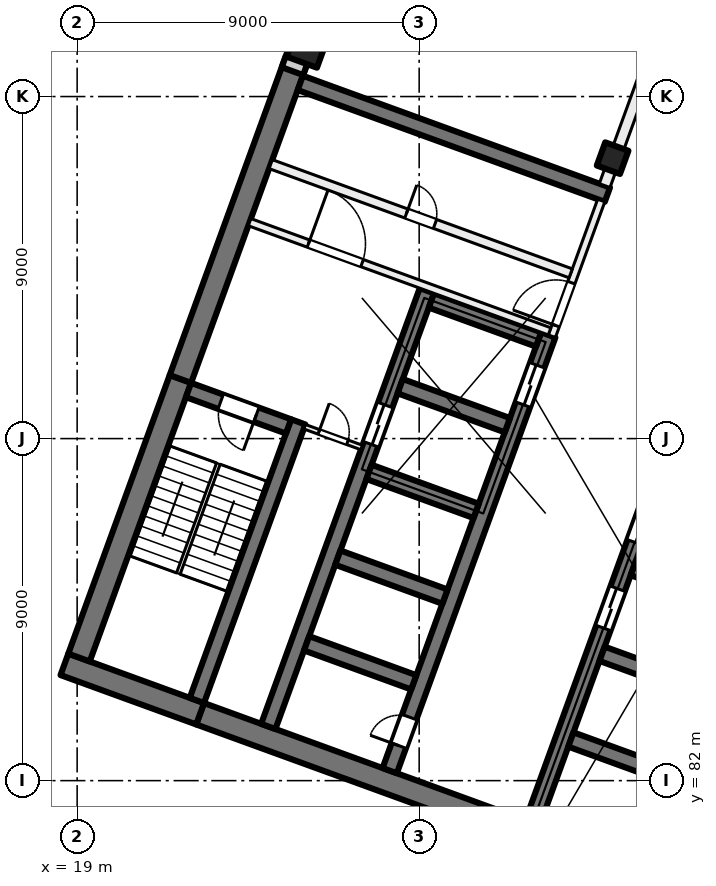
"""IFC4 building model, lengths in metres.
Left out: names, types, materials, properties, quantities, classifications, styles, units other than length and angle.
Written with IfcOpenShell. Run it as: python <this file> out.ifc"""

import sys

from ifc_helpers import new_model, si_unit, direction, frame, frame_2d, origin, origin_2d, place, context, subcontext, project, spatial, rectangle, extrude, element, fill, save


model = new_model("IFC4")
c1 = context("Model", 3, precision=1e-05, world=origin(), true_north=direction((0.0, 1.0)))
c2 = subcontext(c1, "Body", "Model", "MODEL_VIEW")
j1 = project(units=[si_unit("LENGTHUNIT", "METRE"), si_unit("PLANEANGLEUNIT", "RADIAN")], contexts=[c1])
p1 = place(None, origin())
s1 = spatial("IfcSite", under=j1, at=p1, CompositionType="ELEMENT")
p2 = place(p1, origin())
s2 = spatial("IfcBuilding", under=s1, at=p2, CompositionType="ELEMENT")
p3 = place(p2, frame((0.0, 0.0, 93.0)))
s3 = spatial("IfcBuildingStorey", under=s2, at=p3, CompositionType="ELEMENT", Elevation=93.0)
p4 = place(p3, frame((33.091, 98.379, 0.0), z_axis=(0.0, 0.0, 1.0), x_axis=(-0.342020143326, -0.939692620786, 0.0)))
e1 = element("IfcColumn", 1, at=p4, inside=s3, PredefinedType="COLUMN", context=c2, shape_type="SweptSolid", body=[
    extrude(rectangle(XDim=0.65, YDim=0.65, at=origin_2d()), origin(), (0.0, 0.0, 1.0), 4.0),
])
p5 = place(p3, frame((25.056, 101.303, 0.0), z_axis=(0.0, 0.0, 1.0), x_axis=(-0.342020143326, -0.939692620786, 0.0)))
e2 = element("IfcColumn", 2, at=p5, inside=s3, PredefinedType="COLUMN", context=c2, shape_type="SweptSolid", body=[
    extrude(rectangle(XDim=0.85, YDim=0.85, at=origin_2d()), origin(), (0.0, 0.0, 1.0), 4.0),
])
p6 = place(p3, frame((35.767, 78.835, 0.0), z_axis=(0.0, 0.0, 1.0), x_axis=(-0.939692894512, 0.342019391267, 0.0)))
e3 = element("IfcWall", 3, at=p6, inside=s3, PredefinedType="SHEAR", context=c2, shape_type="SweptSolid", body=[
    extrude(rectangle(XDim=14.4, YDim=0.6, at=frame_2d((7.2, 0.0))), origin(), (0.0, 0.0, 1.0), 4.0),
])
p7 = place(p3, frame((22.236, 83.76, 0.0), z_axis=(0.0, 0.0, 1.0), x_axis=(-0.939680822529, 0.342052557032, 0.0)))
e4 = element("IfcWall", 4, at=p7, inside=s3, PredefinedType="SHEAR", context=c2, shape_type="SweptSolid", body=[
    extrude(rectangle(XDim=3.8, YDim=0.6, at=frame_2d((1.9, 0.0))), origin(), (0.0, 0.0, 1.0), 4.0),
])
p8 = place(p3, frame((19.05, 85.239, 0.0), z_axis=(0.0, 0.0, 1.0), x_axis=(0.342016982193, 0.939693771338, 0.0)))
e5 = element("IfcWall", 5, at=p8, inside=s3, PredefinedType="SHEAR", context=c2, shape_type="SweptSolid", body=[
    extrude(rectangle(XDim=7.8, YDim=0.6, at=frame_2d((3.9, 0.0))), origin(), (0.0, 0.0, 1.0), 4.0),
])
p9 = place(p3, frame((21.717, 92.568, 0.0), z_axis=(0.0, 0.0, 1.0), x_axis=(0.342017595281, 0.939693548195, 0.0)))
e6 = element("IfcWall", 6, at=p9, inside=s3, PredefinedType="SHEAR", context=c2, shape_type="SweptSolid", body=[
    extrude(rectangle(XDim=8.925, YDim=0.6, at=frame_2d((4.462, 0.0))), origin(), (0.0, 0.0, 1.0), 4.0),
])
p10 = place(p3, frame((22.15, 84.11, 0.0), z_axis=(0.0, 0.0, 1.0), x_axis=(0.342016982193, 0.939693771338, 0.0)))
e7 = element("IfcWall", 7, at=p10, inside=s3, PredefinedType="SHEAR", context=c2, shape_type="SweptSolid", body=[
    extrude(rectangle(XDim=7.8, YDim=0.4, at=frame_2d((3.9, 0.0))), origin(), (0.0, 0.0, 1.0), 4.0),
])
p11 = place(p3, frame((24.562, 91.32, 0.0), z_axis=(0.0, 0.0, 1.0), x_axis=(-0.939717030584, 0.341953070509, 0.0)))
e8 = element("IfcWall", 8, at=p11, inside=s3, PredefinedType="SHEAR", context=c2, shape_type="SweptSolid", body=[
    extrude(rectangle(XDim=2.8, YDim=0.4, at=frame_2d((1.4, 0.0))), origin(), (0.0, 0.0, 1.0), 4.0),
])
p12 = place(p11, frame((0.9, 0.0, 0.0)))
e9 = element("IfcOpeningElement", 9, at=p12, cuts=e8, PredefinedType="OPENING", context=c2, shape_type="SweptSolid", body=[
    extrude(rectangle(XDim=1.0, YDim=2.1, at=frame_2d((0.5, 1.05))), frame((0.0, 0.21, 0.0), z_axis=(0.0, -1.0, 0.0), x_axis=(1.0, 0.0, 0.0)), (0.0, 0.0, 1.0), 0.42),
])
p13 = place(p3, frame((30.984, 80.895, 0.0), z_axis=(0.0, 0.0, 1.0), x_axis=(0.342021021735, 0.939692301071, 0.0)))
e10 = element("IfcWall", 10, at=p13, inside=s3, PredefinedType="SHEAR", context=c2, shape_type="SweptSolid", body=[
    extrude(rectangle(XDim=12.2, YDim=0.4, at=frame_2d((6.1, 0.0))), origin(), (0.0, 0.0, 1.0), 4.0),
])
p14 = place(p13, frame((5.45, 0.0, 0.0)))
e11 = element("IfcOpeningElement", 11, at=p14, cuts=e10, PredefinedType="OPENING", context=c2, shape_type="SweptSolid", body=[
    extrude(rectangle(XDim=1.1, YDim=2.1, at=frame_2d((0.55, 1.05))), frame((0.0, 0.21, 0.0), z_axis=(0.0, -1.0, 0.0), x_axis=(1.0, 0.0, 0.0)), (0.0, 0.0, 1.0), 0.42),
])
p15 = place(p13, frame((7.85, 0.0, 0.0)))
e12 = element("IfcOpeningElement", 12, at=p15, cuts=e10, PredefinedType="OPENING", context=c2, shape_type="SweptSolid", body=[
    extrude(rectangle(XDim=1.1, YDim=2.1, at=frame_2d((0.55, 1.05))), frame((0.0, 0.21, 0.0), z_axis=(0.0, -1.0, 0.0), x_axis=(1.0, 0.0, 0.0)), (0.0, 0.0, 1.0), 0.42),
])
p16 = place(p13, frame((10.25, 0.0, 0.0)))
e13 = element("IfcOpeningElement", 13, at=p16, cuts=e10, PredefinedType="OPENING", context=c2, shape_type="SweptSolid", body=[
    extrude(rectangle(XDim=1.1, YDim=2.1, at=frame_2d((0.55, 1.05))), frame((0.0, 0.21, 0.0), z_axis=(0.0, -1.0, 0.0), x_axis=(1.0, 0.0, 0.0)), (0.0, 0.0, 1.0), 0.42),
])
for number, where, z_axis, x_axis in (
    (14, (34.812, 82.056, 0.0), (0.0, 0.0, 1.0), (-0.94, 0.342, 0.0)),
    (15, (35.632, 84.311, 0.0), (0.0, 0.0, 1.0), (-0.94, 0.342, 0.0)),
    (16, (36.453, 86.566, 0.0), (0.0, 0.0, 1.0), (-0.94, 0.342, 0.0)),
):
    element("IfcWall", number, at=place(p3, frame(where, z_axis=z_axis, x_axis=x_axis)), inside=s3, PredefinedType="SHEAR", context=c2, shape_type="SweptSolid", body=[
        extrude(rectangle(XDim=3.0, YDim=0.4, at=frame_2d((1.5, 0.0))), origin(), (0.0, 0.0, 1.0), 4.0),
    ])
p17 = place(p3, frame((27.225, 82.263, 0.0), z_axis=(0.0, 0.0, 1.0), x_axis=(0.342014590177, 0.939694641948, 0.0)))
e17 = element("IfcWall", 17, at=p17, inside=s3, PredefinedType="SHEAR", context=c2, shape_type="SweptSolid", body=[
    extrude(rectangle(XDim=12.2, YDim=0.4, at=frame_2d((6.1, 0.0))), origin(), (0.0, 0.0, 1.0), 4.0),
])
p18 = place(p17, frame((10.25, 0.0, 0.0)))
e18 = element("IfcOpeningElement", 18, at=p18, cuts=e17, PredefinedType="OPENING", context=c2, shape_type="SweptSolid", body=[
    extrude(rectangle(XDim=1.1, YDim=2.1, at=frame_2d((0.55, 1.05))), frame((0.0, 0.21, 0.0), z_axis=(0.0, -1.0, 0.0), x_axis=(1.0, 0.0, 0.0)), (0.0, 0.0, 1.0), 0.42),
])
p19 = place(p17, frame((0.7, 0.0, 0.0)))
e19 = element("IfcOpeningElement", 19, at=p19, cuts=e17, PredefinedType="OPENING", context=c2, shape_type="SweptSolid", body=[
    extrude(rectangle(XDim=0.8, YDim=2.1, at=frame_2d((0.4, 1.05))), frame((0.0, 0.21, 0.0), z_axis=(0.0, -1.0, 0.0), x_axis=(1.0, 0.0, 0.0)), (0.0, 0.0, 1.0), 0.42),
])
p20 = place(p3, frame((24.03, 83.426, 0.0), z_axis=(0.0, 0.0, 1.0), x_axis=(0.342014590177, 0.939694641948, 0.0)))
e20 = element("IfcWall", 20, at=p20, inside=s3, PredefinedType="SHEAR", context=c2, shape_type="SweptSolid", body=[
    extrude(rectangle(XDim=12.2, YDim=0.4, at=frame_2d((6.1, 0.0))), origin(), (0.0, 0.0, 1.0), 4.0),
])
p21 = place(p20, frame((7.9, 0.0, 0.0)))
e21 = element("IfcOpeningElement", 21, at=p21, cuts=e20, PredefinedType="OPENING", context=c2, shape_type="SweptSolid", body=[
    extrude(rectangle(XDim=1.1, YDim=2.1, at=frame_2d((0.55, 1.05))), frame((0.0, 0.21, 0.0), z_axis=(0.0, -1.0, 0.0), x_axis=(1.0, 0.0, 0.0)), (0.0, 0.0, 1.0), 0.42),
])
p22 = place(p3, frame((27.858, 84.587, 0.0), z_axis=(0.0, 0.0, 1.0), x_axis=(-0.939686455819, 0.342037080957, 0.0)))
e22 = element("IfcWall", 22, at=p22, inside=s3, PredefinedType="SHEAR", context=c2, shape_type="SweptSolid", body=[
    extrude(rectangle(XDim=3.0, YDim=0.4, at=frame_2d((1.5, 0.0))), origin(), (0.0, 0.0, 1.0), 4.0),
])
p23 = place(p3, frame((28.678, 86.842, 0.0), z_axis=(0.0, 0.0, 1.0), x_axis=(-0.939676934218, 0.342063238742, 0.0)))
e23 = element("IfcWall", 23, at=p23, inside=s3, PredefinedType="SHEAR", context=c2, shape_type="SweptSolid", body=[
    extrude(rectangle(XDim=3.0, YDim=0.4, at=frame_2d((1.5, 0.0))), origin(), (0.0, 0.0, 1.0), 4.0),
])
for number, where, z_axis, x_axis in (
    (24, (29.5, 89.097, 0.0), (0.0, 0.0, 1.0), (-0.94, 0.342, 0.0)),
    (25, (30.32, 91.353, 0.0), (0.0, 0.0, 1.0), (-0.94, 0.342, 0.0)),
    (26, (31.141, 93.608, 0.0), (0.0, 0.0, 1.0), (-0.94, 0.342, 0.0)),
):
    element("IfcWall", number, at=place(p3, frame(where, z_axis=z_axis, x_axis=x_axis)), inside=s3, PredefinedType="SHEAR", context=c2, shape_type="SweptSolid", body=[
        extrude(rectangle(XDim=3.0, YDim=0.4, at=frame_2d((1.5, 0.0))), origin(), (0.0, 0.0, 1.0), 4.0),
    ])
p24 = place(p3, frame((32.953, 97.418, 0.0), z_axis=(0.0, 0.0, 1.0), x_axis=(-0.93969060187, 0.342025690201, 0.0)))
e27 = element("IfcWall", 27, at=p24, inside=s3, PredefinedType="SHEAR", context=c2, shape_type="SweptSolid", body=[
    extrude(rectangle(XDim=8.6, YDim=0.4, at=frame_2d((4.3, 0.0))), origin(), (0.0, 0.0, 1.0), 4.0),
])
p25 = place(p3, frame((24.666, 100.669, 0.0), z_axis=(0.0, 0.0, 1.0), x_axis=(0.34201964167, 0.939692803373, 0.0)))
e28 = element("IfcWall", 28, at=p25, inside=s3, PredefinedType="SOLIDWALL", context=c2, shape_type="SweptSolid", body=[
    extrude(rectangle(XDim=32.884, YDim=0.6, at=frame_2d((16.442, 0.0))), origin(), (0.0, 0.0, 1.0), 3.625),
])
p26 = place(p25, frame((1.48, 0.0, 0.9)))
e29 = element("IfcOpeningElement", 29, at=p26, cuts=e28, PredefinedType="OPENING", context=c2, shape_type="SweptSolid", body=[
    extrude(rectangle(XDim=3.0, YDim=2.4, at=frame_2d((1.5, 1.2))), frame((0.0, 0.31, 0.0), z_axis=(0.0, -1.0, 0.0), x_axis=(1.0, 0.0, 0.0)), (0.0, 0.0, 1.0), 0.62),
])
p27 = place(p25, frame((5.98, 0.0, 0.9)))
e30 = element("IfcOpeningElement", 30, at=p27, cuts=e28, PredefinedType="OPENING", context=c2, shape_type="SweptSolid", body=[
    extrude(rectangle(XDim=3.0, YDim=2.4, at=frame_2d((1.5, 1.2))), frame((0.0, 0.31, 0.0), z_axis=(0.0, -1.0, 0.0), x_axis=(1.0, 0.0, 0.0)), (0.0, 0.0, 1.0), 0.62),
])
p28 = place(p25, frame((10.48, 0.0, 0.9)))
e31 = element("IfcOpeningElement", 31, at=p28, cuts=e28, PredefinedType="OPENING", context=c2, shape_type="SweptSolid", body=[
    extrude(rectangle(XDim=3.0, YDim=2.4, at=frame_2d((1.5, 1.2))), frame((0.0, 0.31, 0.0), z_axis=(0.0, -1.0, 0.0), x_axis=(1.0, 0.0, 0.0)), (0.0, 0.0, 1.0), 0.62),
])
p29 = place(p25, frame((15.58, 0.0, 0.0)))
e32 = element("IfcOpeningElement", 32, at=p29, cuts=e28, PredefinedType="OPENING", context=c2, shape_type="SweptSolid", body=[
    extrude(rectangle(XDim=1.8, YDim=2.4, at=frame_2d((0.9, 1.2))), frame((0.0, 0.31, 0.0), z_axis=(0.0, -1.0, 0.0), x_axis=(1.0, 0.0, 0.0)), (0.0, 0.0, 1.0), 0.62),
])
p30 = place(p25, frame((19.48, 0.0, 0.9)))
e33 = element("IfcOpeningElement", 33, at=p30, cuts=e28, PredefinedType="OPENING", context=c2, shape_type="SweptSolid", body=[
    extrude(rectangle(XDim=3.0, YDim=2.4, at=frame_2d((1.5, 1.2))), frame((0.0, 0.31, 0.0), z_axis=(0.0, -1.0, 0.0), x_axis=(1.0, 0.0, 0.0)), (0.0, 0.0, 1.0), 0.62),
])
p31 = place(p25, frame((23.98, 0.0, 0.9)))
e34 = element("IfcOpeningElement", 34, at=p31, cuts=e28, PredefinedType="OPENING", context=c2, shape_type="SweptSolid", body=[
    extrude(rectangle(XDim=3.0, YDim=2.4, at=frame_2d((1.5, 1.2))), frame((0.0, 0.31, 0.0), z_axis=(0.0, -1.0, 0.0), x_axis=(1.0, 0.0, 0.0)), (0.0, 0.0, 1.0), 0.62),
])
p32 = place(p25, frame((29.08, 0.0, 0.0)))
e35 = element("IfcOpeningElement", 35, at=p32, cuts=e28, PredefinedType="OPENING", context=c2, shape_type="SweptSolid", body=[
    extrude(rectangle(XDim=1.8, YDim=2.4, at=frame_2d((0.9, 1.2))), frame((0.0, 0.31, 0.0), z_axis=(0.0, -1.0, 0.0), x_axis=(1.0, 0.0, 0.0)), (0.0, 0.0, 1.0), 0.62),
])
p33 = place(p3, frame((31.491, 93.693, 0.0), z_axis=(0.0, 0.0, 1.0), x_axis=(0.341995824804, 0.939701471648, 0.0)))
e36 = element("IfcWall", 36, at=p33, inside=s3, PredefinedType="PARTITIONING", context=c2, shape_type="SweptSolid", body=[
    extrude(rectangle(XDim=3.8, YDim=0.2, at=frame_2d((1.9, 0.0))), origin(), (0.0, 0.0, 1.0), 3.625),
])
p34 = place(p33, frame((0.3, 0.0, 0.0)))
e37 = element("IfcOpeningElement", 37, at=p34, cuts=e36, PredefinedType="OPENING", context=c2, shape_type="SweptSolid", body=[
    extrude(rectangle(XDim=1.2, YDim=2.1, at=frame_2d((0.6, 1.05))), frame((0.0, 0.11, 0.0), z_axis=(0.0, -1.0, 0.0), x_axis=(1.0, 0.0, 0.0)), (0.0, 0.0, 1.0), 0.22),
])
p35 = place(p3, frame((23.538, 96.694, 0.0), z_axis=(0.0, 0.0, 1.0), x_axis=(0.939691552312, -0.342023078919, 0.0)))
e38 = element("IfcWall", 38, at=p35, inside=s3, PredefinedType="PARTITIONING", context=c2, shape_type="SweptSolid", body=[
    extrude(rectangle(XDim=8.4, YDim=0.2, at=frame_2d((4.2, 0.0))), origin(), (0.0, 0.0, 1.0), 3.625),
])
p36 = place(p35, frame((1.65, 0.0, 0.0)))
e39 = element("IfcOpeningElement", 39, at=p36, cuts=e38, PredefinedType="OPENING", context=c2, shape_type="SweptSolid", body=[
    extrude(rectangle(XDim=1.5, YDim=2.1, at=frame_2d((0.75, 1.05))), frame((0.0, 0.11, 0.0), z_axis=(0.0, -1.0, 0.0), x_axis=(1.0, 0.0, 0.0)), (0.0, 0.0, 1.0), 0.22),
])
p37 = place(p3, frame((24.094, 98.221, 0.0), z_axis=(0.0, 0.0, 1.0), x_axis=(0.939691552312, -0.342023078919, 0.0)))
e40 = element("IfcWall", 40, at=p37, inside=s3, PredefinedType="PARTITIONING", context=c2, shape_type="SweptSolid", body=[
    extrude(rectangle(XDim=8.4, YDim=0.25, at=frame_2d((4.2, 0.0))), origin(), (0.0, 0.0, 1.0), 3.625),
])
p38 = place(p37, frame((3.8, 0.0, 0.0)))
e41 = element("IfcOpeningElement", 41, at=p38, cuts=e40, PredefinedType="OPENING", context=c2, shape_type="SweptSolid", body=[
    extrude(rectangle(XDim=0.8, YDim=2.1, at=frame_2d((0.4, 1.05))), frame((0.0, 0.135, 0.0), z_axis=(0.0, -1.0, 0.0), x_axis=(1.0, 0.0, 0.0)), (0.0, 0.0, 1.0), 0.27),
])
p39 = place(p3, frame((24.985, 91.312, 0.0), z_axis=(0.0, 0.0, 1.0), x_axis=(0.939708740826, -0.341975850632, 0.0)))
e42 = element("IfcWall", 42, at=p39, inside=s3, PredefinedType="PARTITIONING", context=c2, shape_type="SweptSolid", body=[
    extrude(rectangle(XDim=1.6, YDim=0.125, at=frame_2d((0.8, 0.0))), origin(), (0.0, 0.0, 1.0), 3.625),
])
p40 = place(p39, frame((0.4, 0.0, 0.0)))
e43 = element("IfcOpeningElement", 43, at=p40, cuts=e42, PredefinedType="OPENING", context=c2, shape_type="SweptSolid", body=[
    extrude(rectangle(XDim=0.8, YDim=2.1, at=frame_2d((0.4, 1.05))), frame((0.0, 0.073, 0.0), z_axis=(0.0, -1.0, 0.0), x_axis=(1.0, 0.0, 0.0)), (0.0, 0.0, 1.0), 0.145),
])
p41 = place(p3, frame((32.881, 97.657, 0.0), z_axis=(0.0, 0.0, 1.0), x_axis=(0.342017360004, 0.939693633828, 0.0)))
e44 = element("IfcWall", 44, at=p41, inside=s3, PredefinedType="PARTITIONING", context=c2, shape_type="SweptSolid", body=[
    extrude(rectangle(XDim=34.516, YDim=0.3, at=frame_2d((17.258, 0.0))), origin(), (0.0, 0.0, 1.0), 3.625),
])
p42 = place(p41, frame((7.475, 0.0, 0.0)))
e45 = element("IfcOpeningElement", 45, at=p42, cuts=e44, PredefinedType="OPENING", context=c2, shape_type="SweptSolid", body=[
    extrude(rectangle(XDim=1.8, YDim=2.1, at=frame_2d((0.9, 1.05))), frame((0.0, 0.16, 0.0), z_axis=(0.0, -1.0, 0.0), x_axis=(1.0, 0.0, 0.0)), (0.0, 0.0, 1.0), 0.32),
])
p43 = place(p41, frame((25.0, 0.0, 0.0)))
e46 = element("IfcOpeningElement", 46, at=p43, cuts=e44, PredefinedType="OPENING", context=c2, shape_type="SweptSolid", body=[
    extrude(rectangle(XDim=1.0, YDim=2.1, at=frame_2d((0.5, 1.05))), frame((0.0, 0.16, 0.0), z_axis=(0.0, -1.0, 0.0), x_axis=(1.0, 0.0, 0.0)), (0.0, 0.0, 1.0), 0.32),
])
p44 = place(p41, frame((29.779, 0.0, 0.0)))
e47 = element("IfcOpeningElement", 47, at=p44, cuts=e44, PredefinedType="OPENING", context=c2, shape_type="SweptSolid", body=[
    extrude(rectangle(XDim=1.8, YDim=2.1, at=frame_2d((0.9, 1.05))), frame((0.0, 0.16, 0.0), z_axis=(0.0, -1.0, 0.0), x_axis=(1.0, 0.0, 0.0)), (0.0, 0.0, 1.0), 0.32),
])
p45 = place(p18, origin())
e48 = element("IfcDoor", 48, at=p45, inside=s3, OperationType="DOUBLE_DOOR_SLIDING", PredefinedType="DOOR", context=c2, shape_type="SweptSolid", body=[
    extrude(rectangle(XDim=1.1, YDim=2.1, at=frame_2d((0.55, 1.05))), frame((0.0, 0.025, 0.0), z_axis=(0.0, -1.0, 0.0), x_axis=(1.0, 0.0, 0.0)), (0.0, 0.0, 1.0), 0.05),
])
fill(e18, e48)
p46 = place(p14, origin())
e49 = element("IfcDoor", 49, at=p46, inside=s3, OperationType="DOUBLE_DOOR_SLIDING", PredefinedType="DOOR", context=c2, shape_type="SweptSolid", body=[
    extrude(rectangle(XDim=1.1, YDim=2.1, at=frame_2d((0.55, 1.05))), frame((0.0, 0.025, 0.0), z_axis=(0.0, -1.0, 0.0), x_axis=(1.0, 0.0, 0.0)), (0.0, 0.0, 1.0), 0.05),
])
fill(e11, e49)
p47 = place(p15, origin())
e50 = element("IfcDoor", 50, at=p47, inside=s3, OperationType="DOUBLE_DOOR_SLIDING", PredefinedType="DOOR", context=c2, shape_type="SweptSolid", body=[
    extrude(rectangle(XDim=1.1, YDim=2.1, at=frame_2d((0.55, 1.05))), frame((0.0, 0.025, 0.0), z_axis=(0.0, -1.0, 0.0), x_axis=(1.0, 0.0, 0.0)), (0.0, 0.0, 1.0), 0.05),
])
fill(e12, e50)
p48 = place(p19, origin())
e51 = element("IfcDoor", 51, at=p48, inside=s3, OperationType="SINGLE_SWING_LEFT", PredefinedType="DOOR", context=c2, shape_type="SweptSolid", body=[
    extrude(rectangle(XDim=0.8, YDim=2.1, at=frame_2d((0.4, 1.05))), frame((0.0, 0.025, 0.0), z_axis=(0.0, -1.0, 0.0), x_axis=(1.0, 0.0, 0.0)), (0.0, 0.0, 1.0), 0.05),
])
fill(e19, e51)
p49 = place(p34, origin())
e52 = element("IfcDoor", 52, at=p49, inside=s3, OperationType="DOUBLE_DOOR_SINGLE_SWING", PredefinedType="DOOR", context=c2, shape_type="SweptSolid", body=[
    extrude(rectangle(XDim=1.2, YDim=2.1, at=frame_2d((0.6, 1.05))), frame((0.0, 0.025, 0.0), z_axis=(0.0, -1.0, 0.0), x_axis=(1.0, 0.0, 0.0)), (0.0, 0.0, 1.0), 0.05),
])
fill(e37, e52)
p50 = place(p36, origin())
e53 = element("IfcDoor", 53, at=p50, inside=s3, OperationType="DOUBLE_DOOR_SINGLE_SWING", PredefinedType="DOOR", context=c2, shape_type="SweptSolid", body=[
    extrude(rectangle(XDim=1.5, YDim=2.1, at=frame_2d((0.75, 1.05))), frame((0.0, 0.025, 0.0), z_axis=(0.0, -1.0, 0.0), x_axis=(1.0, 0.0, 0.0)), (0.0, 0.0, 1.0), 0.05),
])
fill(e39, e53)
p51 = place(p12, origin())
e54 = element("IfcDoor", 54, at=p51, inside=s3, OperationType="SINGLE_SWING_LEFT", PredefinedType="DOOR", context=c2, shape_type="SweptSolid", body=[
    extrude(rectangle(XDim=1.0, YDim=2.1, at=frame_2d((0.5, 1.05))), frame((0.0, 0.025, 0.0), z_axis=(0.0, -1.0, 0.0), x_axis=(1.0, 0.0, 0.0)), (0.0, 0.0, 1.0), 0.05),
])
fill(e9, e54)
p52 = place(p40, origin())
e55 = element("IfcDoor", 55, at=p52, inside=s3, OperationType="SINGLE_SWING_RIGHT", PredefinedType="DOOR", context=c2, shape_type="SweptSolid", body=[
    extrude(rectangle(XDim=0.8, YDim=2.1, at=frame_2d((0.4, 1.05))), frame((0.0, 0.025, 0.0), z_axis=(0.0, -1.0, 0.0), x_axis=(1.0, 0.0, 0.0)), (0.0, 0.0, 1.0), 0.05),
])
fill(e43, e55)
p53 = place(p38, origin())
e56 = element("IfcDoor", 56, at=p53, inside=s3, OperationType="SINGLE_SWING_LEFT", PredefinedType="DOOR", context=c2, shape_type="SweptSolid", body=[
    extrude(rectangle(XDim=0.8, YDim=2.1, at=frame_2d((0.4, 1.05))), frame((0.0, 0.025, 0.0), z_axis=(0.0, -1.0, 0.0), x_axis=(1.0, 0.0, 0.0)), (0.0, 0.0, 1.0), 0.05),
])
fill(e41, e56)
p54 = place(p21, origin())
e57 = element("IfcDoor", 57, at=p54, inside=s3, OperationType="DOUBLE_DOOR_SLIDING", PredefinedType="DOOR", context=c2, shape_type="SweptSolid", body=[
    extrude(rectangle(XDim=1.1, YDim=2.1, at=frame_2d((0.55, 1.05))), frame((0.0, 0.025, 0.0), z_axis=(0.0, -1.0, 0.0), x_axis=(1.0, 0.0, 0.0)), (0.0, 0.0, 1.0), 0.05),
])
fill(e21, e57)
save(model, sys.argv[1])
